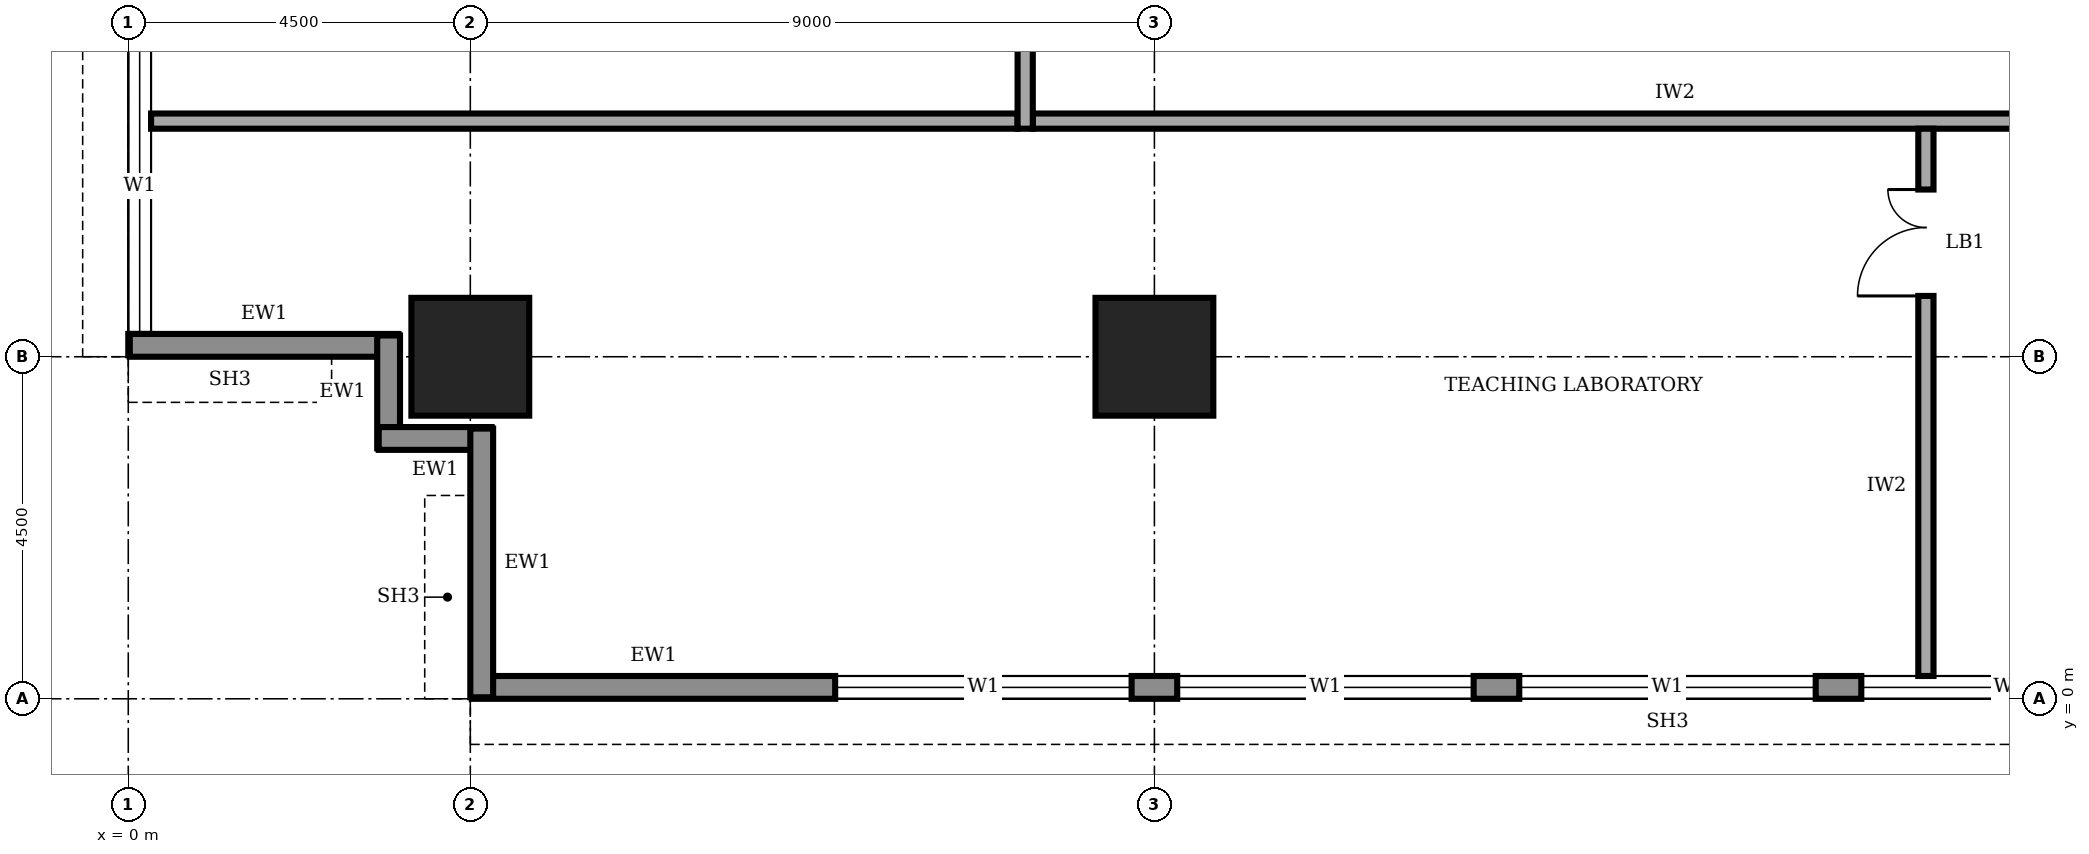
"""IFC4 building model, lengths in metres.
Left out: names, types, materials, properties, quantities, classifications, styles, units other than length and angle.
Written with IfcOpenShell. Run it as: python <this file> out.ifc"""

import sys

from ifc_helpers import new_model, si_unit, direction, frame, frame_2d, origin, origin_2d, place, context, subcontext, project, spatial, rectangle, extrude, element, fill, save


model = new_model("IFC4")
c1 = context("Model", 3, precision=1e-05, world=origin(), true_north=direction((0.0, 1.0)))
c2 = subcontext(c1, "Body", "Model", "MODEL_VIEW")
j1 = project(units=[si_unit("LENGTHUNIT", "METRE"), si_unit("PLANEANGLEUNIT", "RADIAN")], contexts=[c1])
p1 = place(None, origin())
s1 = spatial("IfcSite", under=j1, at=p1, CompositionType="ELEMENT")
p2 = place(p1, origin())
s2 = spatial("IfcBuilding", under=s1, at=p2, CompositionType="ELEMENT")
p3 = place(p2, frame((0.0, 0.0, 205.0)))
s3 = spatial("IfcBuildingStorey", under=s2, at=p3, CompositionType="ELEMENT", Elevation=205.0)
for number, where, z_axis, x_axis in (
    (1, (4.5, 4.5, 0.0), (0.0, 0.0, 1.0), (1.0, 0.0, 0.0)),
    (2, (13.5, 4.5, 0.0), (0.0, 0.0, 1.0), (1.0, 0.0, 0.0)),
):
    element("IfcColumn", number, at=place(p3, frame(where, z_axis=z_axis, x_axis=x_axis)), inside=s3, PredefinedType="COLUMN", context=c2, shape_type="SweptSolid", body=[
        extrude(rectangle(XDim=1.55, YDim=1.55, at=origin_2d()), origin(), (0.0, 0.0, 1.0), 4.0),
    ])
p4 = place(p3, frame((4.52, 0.15, 0.0), z_axis=(0.0, 0.0, 1.0), x_axis=(1.0, 0.0, 0.0)))
e3 = element("IfcWall", 3, at=p4, inside=s3, PredefinedType="STANDARD", context=c2, shape_type="SweptSolid", body=[
    extrude(rectangle(XDim=31.46, YDim=0.3, at=frame_2d((15.73, 0.0))), origin(), (0.0, 0.0, 1.0), 3.75),
])
p5 = place(p4, frame((4.78, 0.0, 0.9)))
e4 = element("IfcOpeningElement", 4, at=p5, cuts=e3, PredefinedType="OPENING", context=c2, shape_type="SweptSolid", body=[
    extrude(rectangle(XDim=3.9, YDim=2.2, at=frame_2d((1.95, 1.1))), frame((0.0, 0.16, 0.0), z_axis=(0.0, -1.0, 0.0), x_axis=(1.0, 0.0, 0.0)), (0.0, 0.0, 1.0), 0.32),
])
p6 = place(p4, frame((9.28, 0.0, 0.9)))
e5 = element("IfcOpeningElement", 5, at=p6, cuts=e3, PredefinedType="OPENING", context=c2, shape_type="SweptSolid", body=[
    extrude(rectangle(XDim=3.9, YDim=2.2, at=frame_2d((1.95, 1.1))), frame((0.0, 0.16, 0.0), z_axis=(0.0, -1.0, 0.0), x_axis=(1.0, 0.0, 0.0)), (0.0, 0.0, 1.0), 0.32),
])
p7 = place(p4, frame((13.78, 0.0, 0.9)))
e6 = element("IfcOpeningElement", 6, at=p7, cuts=e3, PredefinedType="OPENING", context=c2, shape_type="SweptSolid", body=[
    extrude(rectangle(XDim=3.9, YDim=2.2, at=frame_2d((1.95, 1.1))), frame((0.0, 0.16, 0.0), z_axis=(0.0, -1.0, 0.0), x_axis=(1.0, 0.0, 0.0)), (0.0, 0.0, 1.0), 0.32),
])
p8 = place(p4, frame((18.28, 0.0, 0.9)))
e7 = element("IfcOpeningElement", 7, at=p8, cuts=e3, PredefinedType="OPENING", context=c2, shape_type="SweptSolid", body=[
    extrude(rectangle(XDim=3.9, YDim=2.2, at=frame_2d((1.95, 1.1))), frame((0.0, 0.16, 0.0), z_axis=(0.0, -1.0, 0.0), x_axis=(1.0, 0.0, 0.0)), (0.0, 0.0, 1.0), 0.32),
])
p9 = place(p4, frame((22.78, 0.0, 0.9)))
e8 = element("IfcOpeningElement", 8, at=p9, cuts=e3, PredefinedType="OPENING", context=c2, shape_type="SweptSolid", body=[
    extrude(rectangle(XDim=3.9, YDim=2.2, at=frame_2d((1.95, 1.1))), frame((0.0, 0.16, 0.0), z_axis=(0.0, -1.0, 0.0), x_axis=(1.0, 0.0, 0.0)), (0.0, 0.0, 1.0), 0.32),
])
p10 = place(p4, frame((27.28, 0.0, 0.9)))
e9 = element("IfcOpeningElement", 9, at=p10, cuts=e3, PredefinedType="OPENING", context=c2, shape_type="SweptSolid", body=[
    extrude(rectangle(XDim=3.9, YDim=2.2, at=frame_2d((1.95, 1.1))), frame((0.0, 0.16, 0.0), z_axis=(0.0, -1.0, 0.0), x_axis=(1.0, 0.0, 0.0)), (0.0, 0.0, 1.0), 0.32),
])
p11 = place(p3, frame((0.15, 35.98, 0.0), z_axis=(0.0, 0.0, 1.0), x_axis=(0.0, -1.0, 0.0)))
e10 = element("IfcWall", 10, at=p11, inside=s3, PredefinedType="STANDARD", context=c2, shape_type="SweptSolid", body=[
    extrude(rectangle(XDim=31.46, YDim=0.3, at=frame_2d((15.73, 0.0))), origin(), (0.0, 0.0, 1.0), 3.75),
])
p12 = place(p11, frame((27.28, 0.0, 0.9)))
e11 = element("IfcOpeningElement", 11, at=p12, cuts=e10, PredefinedType="OPENING", context=c2, shape_type="SweptSolid", body=[
    extrude(rectangle(XDim=3.9, YDim=2.2, at=frame_2d((1.95, 1.1))), frame((0.0, 0.16, 0.0), z_axis=(0.0, -1.0, 0.0), x_axis=(1.0, 0.0, 0.0)), (0.0, 0.0, 1.0), 0.32),
])
p13 = place(p11, frame((22.78, 0.0, 0.9)))
e12 = element("IfcOpeningElement", 12, at=p13, cuts=e10, PredefinedType="OPENING", context=c2, shape_type="SweptSolid", body=[
    extrude(rectangle(XDim=3.9, YDim=2.2, at=frame_2d((1.95, 1.1))), frame((0.0, 0.16, 0.0), z_axis=(0.0, -1.0, 0.0), x_axis=(1.0, 0.0, 0.0)), (0.0, 0.0, 1.0), 0.32),
])
p14 = place(p11, frame((18.28, 0.0, 0.9)))
e13 = element("IfcOpeningElement", 13, at=p14, cuts=e10, PredefinedType="OPENING", context=c2, shape_type="SweptSolid", body=[
    extrude(rectangle(XDim=3.9, YDim=2.2, at=frame_2d((1.95, 1.1))), frame((0.0, 0.16, 0.0), z_axis=(0.0, -1.0, 0.0), x_axis=(1.0, 0.0, 0.0)), (0.0, 0.0, 1.0), 0.32),
])
p15 = place(p11, frame((13.78, 0.0, 0.9)))
e14 = element("IfcOpeningElement", 14, at=p15, cuts=e10, PredefinedType="OPENING", context=c2, shape_type="SweptSolid", body=[
    extrude(rectangle(XDim=3.9, YDim=2.2, at=frame_2d((1.95, 1.1))), frame((0.0, 0.16, 0.0), z_axis=(0.0, -1.0, 0.0), x_axis=(1.0, 0.0, 0.0)), (0.0, 0.0, 1.0), 0.32),
])
p16 = place(p11, frame((9.28, 0.0, 0.9)))
e15 = element("IfcOpeningElement", 15, at=p16, cuts=e10, PredefinedType="OPENING", context=c2, shape_type="SweptSolid", body=[
    extrude(rectangle(XDim=3.9, YDim=2.2, at=frame_2d((1.95, 1.1))), frame((0.0, 0.16, 0.0), z_axis=(0.0, -1.0, 0.0), x_axis=(1.0, 0.0, 0.0)), (0.0, 0.0, 1.0), 0.32),
])
p17 = place(p11, frame((4.78, 0.0, 0.9)))
e16 = element("IfcOpeningElement", 16, at=p17, cuts=e10, PredefinedType="OPENING", context=c2, shape_type="SweptSolid", body=[
    extrude(rectangle(XDim=3.9, YDim=2.2, at=frame_2d((1.95, 1.1))), frame((0.0, 0.16, 0.0), z_axis=(0.0, -1.0, 0.0), x_axis=(1.0, 0.0, 0.0)), (0.0, 0.0, 1.0), 0.32),
])
p18 = place(p3, frame((0.02, 4.65, 0.0), z_axis=(0.0, 0.0, 1.0), x_axis=(1.0, 0.0, 0.0)))
e17 = element("IfcWall", 17, at=p18, inside=s3, PredefinedType="STANDARD", context=c2, shape_type="SweptSolid", body=[
    extrude(rectangle(XDim=3.535, YDim=0.3, at=frame_2d((1.768, 0.0))), origin(), (0.0, 0.0, 1.0), 2.85),
])
for number, where, z_axis, x_axis in (
    (18, (3.425, 4.78, 0.0), (0.0, 0.0, 1.0), (0.0, -1.0, 0.0)),
    (19, (3.295, 3.425, 0.0), (0.0, 0.0, 1.0), (1.0, 0.0, 0.0)),
):
    element("IfcWall", number, at=place(p3, frame(where, z_axis=z_axis, x_axis=x_axis)), inside=s3, PredefinedType="STANDARD", context=c2, shape_type="SweptSolid", body=[
        extrude(rectangle(XDim=1.485, YDim=0.3, at=frame_2d((0.743, 0.0))), origin(), (0.0, 0.0, 1.0), 3.75),
    ])
p19 = place(p3, frame((4.65, 3.555, 0.0), z_axis=(0.0, 0.0, 1.0), x_axis=(0.0, -1.0, 0.0)))
e20 = element("IfcWall", 20, at=p19, inside=s3, PredefinedType="STANDARD", context=c2, shape_type="SweptSolid", body=[
    extrude(rectangle(XDim=3.535, YDim=0.3, at=frame_2d((1.768, 0.0))), origin(), (0.0, 0.0, 1.0), 2.85),
])
p20 = place(p3, frame((11.9, 7.6, 0.0), z_axis=(0.0, 0.0, 1.0), x_axis=(1.0, 0.0, 0.0)))
e21 = element("IfcWall", 21, at=p20, inside=s3, PredefinedType="SOLIDWALL", context=c2, shape_type="SweptSolid", body=[
    extrude(rectangle(XDim=16.9, YDim=0.2, at=frame_2d((8.45, 0.0))), origin(), (0.0, 0.0, 1.0), 3.75),
])
p21 = place(p3, frame((11.8, 31.3, 0.0), z_axis=(0.0, 0.0, 1.0), x_axis=(0.0, -1.0, 0.0)))
e22 = element("IfcWall", 22, at=p21, inside=s3, PredefinedType="SOLIDWALL", context=c2, shape_type="SweptSolid", body=[
    extrude(rectangle(XDim=23.8, YDim=0.2, at=frame_2d((11.9, 0.0))), origin(), (0.0, 0.0, 1.0), 3.75),
])
p22 = place(p21, frame((20.3, 0.0, 0.0)))
e23 = element("IfcOpeningElement", 23, at=p22, cuts=e22, PredefinedType="OPENING", context=c2, shape_type="SweptSolid", body=[
    extrude(rectangle(XDim=1.0, YDim=2.1, at=frame_2d((0.5, 1.05))), frame((0.0, 0.11, 0.0), z_axis=(0.0, -1.0, 0.0), x_axis=(1.0, 0.0, 0.0)), (0.0, 0.0, 1.0), 0.22),
])
p23 = place(p21, frame((15.45, 0.0, 0.0)))
e24 = element("IfcOpeningElement", 24, at=p23, cuts=e22, PredefinedType="OPENING", context=c2, shape_type="SweptSolid", body=[
    extrude(rectangle(XDim=0.9, YDim=2.1, at=frame_2d((0.45, 1.05))), frame((0.0, 0.11, 0.0), z_axis=(0.0, -1.0, 0.0), x_axis=(1.0, 0.0, 0.0)), (0.0, 0.0, 1.0), 0.22),
])
p24 = place(p21, frame((12.45, 0.0, 0.0)))
e25 = element("IfcOpeningElement", 25, at=p24, cuts=e22, PredefinedType="OPENING", context=c2, shape_type="SweptSolid", body=[
    extrude(rectangle(XDim=0.9, YDim=2.1, at=frame_2d((0.45, 1.05))), frame((0.0, 0.11, 0.0), z_axis=(0.0, -1.0, 0.0), x_axis=(1.0, 0.0, 0.0)), (0.0, 0.0, 1.0), 0.22),
])
p25 = place(p21, frame((7.6, 0.0, 0.0)))
e26 = element("IfcOpeningElement", 26, at=p25, cuts=e22, PredefinedType="OPENING", context=c2, shape_type="SweptSolid", body=[
    extrude(rectangle(XDim=0.9, YDim=2.1, at=frame_2d((0.45, 1.05))), frame((0.0, 0.11, 0.0), z_axis=(0.0, -1.0, 0.0), x_axis=(1.0, 0.0, 0.0)), (0.0, 0.0, 1.0), 0.22),
])
p26 = place(p21, frame((4.8, 0.0, 0.0)))
e27 = element("IfcOpeningElement", 27, at=p26, cuts=e22, PredefinedType="OPENING", context=c2, shape_type="SweptSolid", body=[
    extrude(rectangle(XDim=1.0, YDim=2.1, at=frame_2d((0.5, 1.05))), frame((0.0, 0.11, 0.0), z_axis=(0.0, -1.0, 0.0), x_axis=(1.0, 0.0, 0.0)), (0.0, 0.0, 1.0), 0.22),
])
p27 = place(p21, frame((10.3, 0.0, 0.0)))
e28 = element("IfcOpeningElement", 28, at=p27, cuts=e22, PredefinedType="OPENING", context=c2, shape_type="SweptSolid", body=[
    extrude(rectangle(XDim=1.0, YDim=2.1, at=frame_2d((0.5, 1.05))), frame((0.0, 0.11, 0.0), z_axis=(0.0, -1.0, 0.0), x_axis=(1.0, 0.0, 0.0)), (0.0, 0.0, 1.0), 0.22),
])
p28 = place(p21, frame((1.55, 0.0, 0.0)))
e29 = element("IfcOpeningElement", 29, at=p28, cuts=e22, PredefinedType="OPENING", context=c2, shape_type="SweptSolid", body=[
    extrude(rectangle(XDim=1.0, YDim=2.1, at=frame_2d((0.5, 1.05))), frame((0.0, 0.11, 0.0), z_axis=(0.0, -1.0, 0.0), x_axis=(1.0, 0.0, 0.0)), (0.0, 0.0, 1.0), 0.22),
])
p29 = place(p3, frame((23.65, 0.3, 0.0), z_axis=(0.0, 0.0, 1.0), x_axis=(0.0, 1.0, 0.0)))
e30 = element("IfcWall", 30, at=p29, inside=s3, PredefinedType="SOLIDWALL", context=c2, shape_type="SweptSolid", body=[
    extrude(rectangle(XDim=7.2, YDim=0.2, at=frame_2d((3.6, 0.0))), origin(), (0.0, 0.0, 1.0), 3.75),
])
p30 = place(p29, frame((5.0, 0.0, 0.0)))
e31 = element("IfcOpeningElement", 31, at=p30, cuts=e30, PredefinedType="OPENING", context=c2, shape_type="SweptSolid", body=[
    extrude(rectangle(XDim=1.4, YDim=2.1, at=frame_2d((0.7, 1.05))), frame((0.0, 0.11, 0.0), z_axis=(0.0, -1.0, 0.0), x_axis=(1.0, 0.0, 0.0)), (0.0, 0.0, 1.0), 0.22),
])
p31 = place(p3, frame((0.3, 7.6, 0.0), z_axis=(0.0, 0.0, 1.0), x_axis=(1.0, 0.0, 0.0)))
e32 = element("IfcWall", 32, at=p31, inside=s3, PredefinedType="SOLIDWALL", context=c2, shape_type="SweptSolid", body=[
    extrude(rectangle(XDim=11.4, YDim=0.2, at=frame_2d((5.7, 0.0))), origin(), (0.0, 0.0, 1.0), 3.75),
])
p32 = place(p5, origin())
e33 = element("IfcWindow", 33, at=p32, inside=s3, PartitioningType="SINGLE_PANEL", PredefinedType="WINDOW", context=c2, shape_type="SweptSolid", body=[
    extrude(rectangle(XDim=3.9, YDim=2.2, at=frame_2d((1.95, 1.1))), frame((0.0, 0.03, 0.0), z_axis=(0.0, -1.0, 0.0), x_axis=(1.0, 0.0, 0.0)), (0.0, 0.0, 1.0), 0.06),
])
fill(e4, e33)
p33 = place(p6, origin())
e34 = element("IfcWindow", 34, at=p33, inside=s3, PartitioningType="SINGLE_PANEL", PredefinedType="WINDOW", context=c2, shape_type="SweptSolid", body=[
    extrude(rectangle(XDim=3.9, YDim=2.2, at=frame_2d((1.95, 1.1))), frame((0.0, 0.03, 0.0), z_axis=(0.0, -1.0, 0.0), x_axis=(1.0, 0.0, 0.0)), (0.0, 0.0, 1.0), 0.06),
])
fill(e5, e34)
p34 = place(p7, origin())
e35 = element("IfcWindow", 35, at=p34, inside=s3, PartitioningType="SINGLE_PANEL", PredefinedType="WINDOW", context=c2, shape_type="SweptSolid", body=[
    extrude(rectangle(XDim=3.9, YDim=2.2, at=frame_2d((1.95, 1.1))), frame((0.0, 0.03, 0.0), z_axis=(0.0, -1.0, 0.0), x_axis=(1.0, 0.0, 0.0)), (0.0, 0.0, 1.0), 0.06),
])
fill(e6, e35)
p35 = place(p8, origin())
e36 = element("IfcWindow", 36, at=p35, inside=s3, PartitioningType="SINGLE_PANEL", PredefinedType="WINDOW", context=c2, shape_type="SweptSolid", body=[
    extrude(rectangle(XDim=3.9, YDim=2.2, at=frame_2d((1.95, 1.1))), frame((0.0, 0.03, 0.0), z_axis=(0.0, -1.0, 0.0), x_axis=(1.0, 0.0, 0.0)), (0.0, 0.0, 1.0), 0.06),
])
fill(e7, e36)
p36 = place(p12, origin())
e37 = element("IfcWindow", 37, at=p36, inside=s3, PartitioningType="SINGLE_PANEL", PredefinedType="WINDOW", context=c2, shape_type="SweptSolid", body=[
    extrude(rectangle(XDim=3.9, YDim=2.2, at=frame_2d((1.95, 1.1))), frame((0.0, 0.03, 0.0), z_axis=(0.0, -1.0, 0.0), x_axis=(1.0, 0.0, 0.0)), (0.0, 0.0, 1.0), 0.06),
])
fill(e11, e37)
p37 = place(p30, origin())
e38 = element("IfcDoor", 38, at=p37, inside=s3, OperationType="DOUBLE_DOOR_SINGLE_SWING", PredefinedType="DOOR", context=c2, shape_type="SweptSolid", body=[
    extrude(rectangle(XDim=1.4, YDim=2.1, at=frame_2d((0.7, 1.05))), frame((0.0, 0.025, 0.0), z_axis=(0.0, -1.0, 0.0), x_axis=(1.0, 0.0, 0.0)), (0.0, 0.0, 1.0), 0.05),
])
fill(e31, e38)
save(model, sys.argv[1])
